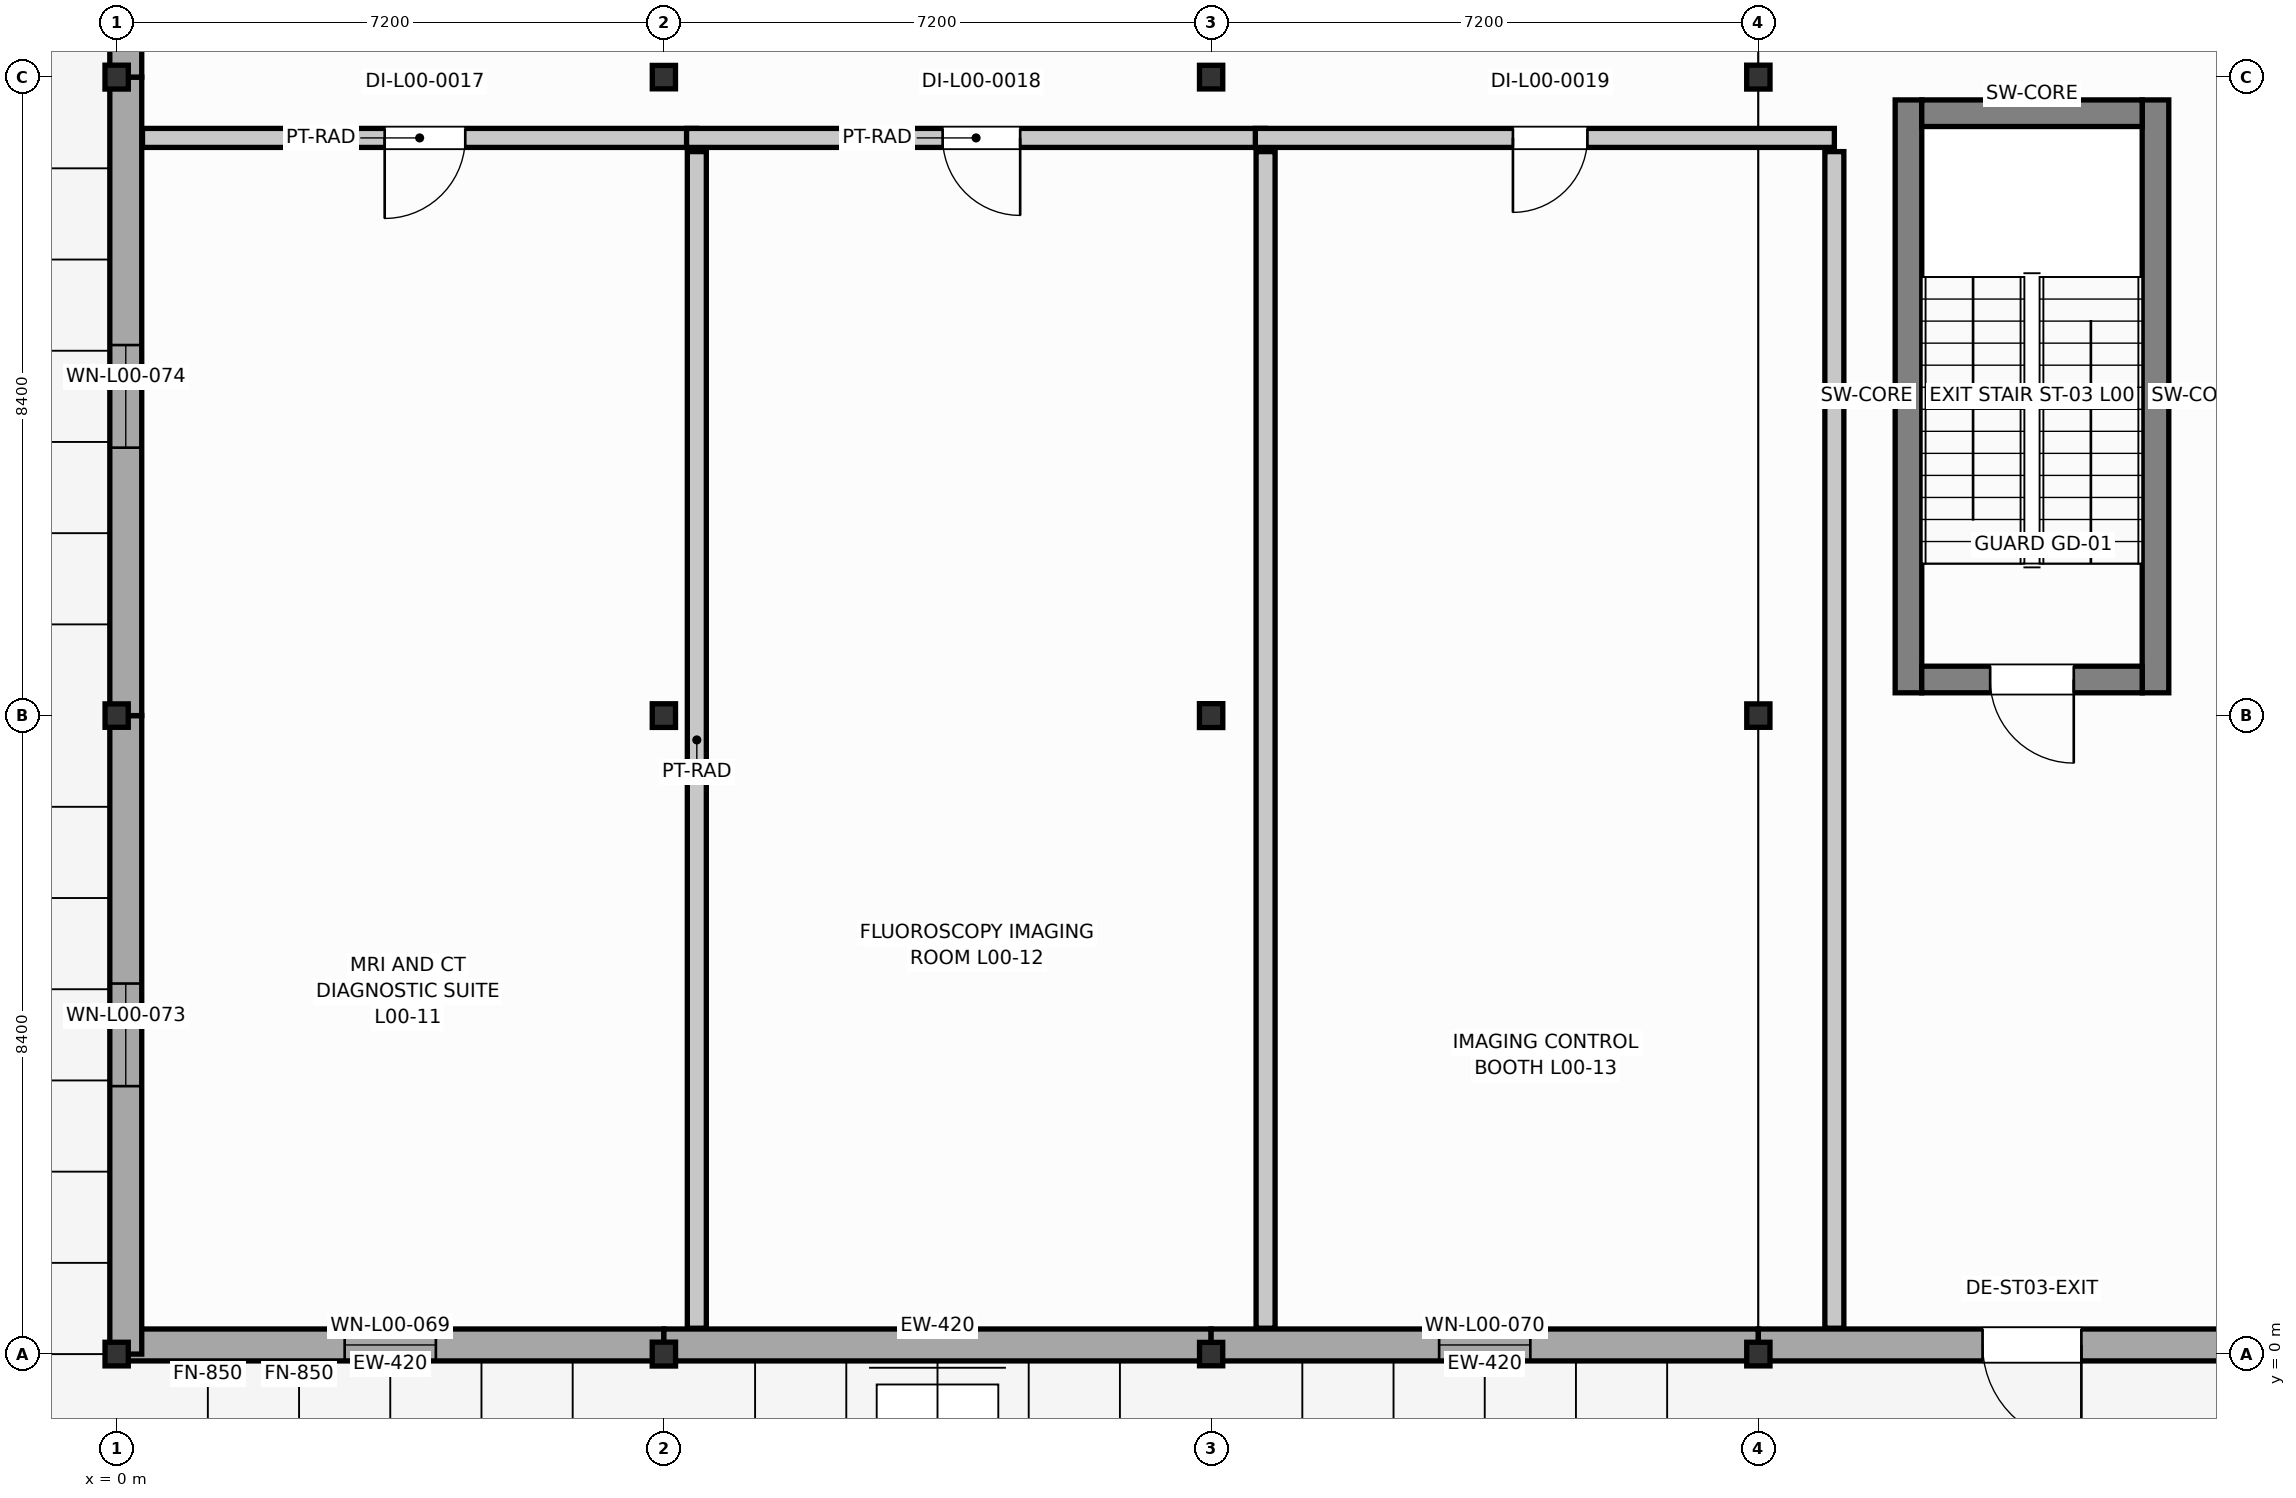
"""IFC4 building model, lengths in metres.
Left out: names, types, materials, properties, quantities, classifications, styles, units other than length and angle.
Written with IfcOpenShell. Run it as: python <this file> out.ifc"""

import sys

from ifc_helpers import new_model, si_unit, direction, frame, frame_2d, origin, origin_with_axes, origin_2d, place, context, subcontext, project, spatial, rectangle, i_section, extrude, element, fill, save


model = new_model("IFC4")
c1 = context("Model", 3, precision=1e-05, world=origin(), true_north=direction((0.0, 1.0)))
c2 = subcontext(c1, "Body", "Model", "MODEL_VIEW")
j1 = project(units=[si_unit("LENGTHUNIT", "METRE"), si_unit("PLANEANGLEUNIT", "RADIAN")], contexts=[c1])
p1 = place(None, origin())
s1 = spatial("IfcSite", under=j1, at=p1, CompositionType="ELEMENT")
p2 = place(p1, origin())
s2 = spatial("IfcBuilding", under=s1, at=p2, CompositionType="ELEMENT")
p3 = place(p2, origin())
s3 = spatial("IfcBuildingStorey", under=s2, at=p3, CompositionType="ELEMENT", Elevation=0.0)
p4 = place(p3, origin_with_axes())
e1 = element("IfcColumn", 1, at=p4, inside=s3, PredefinedType="COLUMN", context=c2, shape_type="SweptSolid", body=[
    extrude(i_section(OverallWidth=0.306, OverallDepth=0.311, WebThickness=0.011, FlangeThickness=0.017, FilletRadius=0.015, at=origin_2d()), origin(), (0.0, 0.0, 1.0), 4.8),
])
p5 = place(p3, frame((0.0, 8.4, 0.0), z_axis=(0.0, 0.0, 1.0), x_axis=(1.0, 0.0, 0.0)))
e2 = element("IfcColumn", 2, at=p5, inside=s3, PredefinedType="COLUMN", context=c2, shape_type="SweptSolid", body=[
    extrude(i_section(OverallWidth=0.305, OverallDepth=0.308, WebThickness=0.01, FlangeThickness=0.015, FilletRadius=0.015, at=origin_2d()), origin(), (0.0, 0.0, 1.0), 4.8),
])
for number, where, z_axis, x_axis in (
    (3, (0.0, 16.8, 0.0), (0.0, 0.0, 1.0), (1.0, 0.0, 0.0)),
    (4, (7.2, 0.0, 0.0), (0.0, 0.0, 1.0), (1.0, 0.0, 0.0)),
):
    element("IfcColumn", number, at=place(p3, frame(where, z_axis=z_axis, x_axis=x_axis)), inside=s3, PredefinedType="COLUMN", context=c2, shape_type="SweptSolid", body=[
        extrude(i_section(OverallWidth=0.307, OverallDepth=0.314, WebThickness=0.012, FlangeThickness=0.019, FilletRadius=0.016, at=origin_2d()), origin(), (0.0, 0.0, 1.0), 4.8),
    ])
p6 = place(p3, frame((7.2, 8.4, 0.0), z_axis=(0.0, 0.0, 1.0), x_axis=(1.0, 0.0, 0.0)))
e5 = element("IfcColumn", 5, at=p6, inside=s3, PredefinedType="COLUMN", context=c2, shape_type="SweptSolid", body=[
    extrude(i_section(OverallWidth=0.306, OverallDepth=0.311, WebThickness=0.011, FlangeThickness=0.017, FilletRadius=0.015, at=origin_2d()), origin(), (0.0, 0.0, 1.0), 4.8),
])
for number, where, z_axis, x_axis in (
    (6, (7.2, 16.8, 0.0), (0.0, 0.0, 1.0), (1.0, 0.0, 0.0)),
    (7, (14.4, 0.0, 0.0), (0.0, 0.0, 1.0), (1.0, 0.0, 0.0)),
):
    element("IfcColumn", number, at=place(p3, frame(where, z_axis=z_axis, x_axis=x_axis)), inside=s3, PredefinedType="COLUMN", context=c2, shape_type="SweptSolid", body=[
        extrude(i_section(OverallWidth=0.305, OverallDepth=0.308, WebThickness=0.01, FlangeThickness=0.015, FilletRadius=0.015, at=origin_2d()), origin(), (0.0, 0.0, 1.0), 4.8),
    ])
p7 = place(p3, frame((14.4, 8.4, 0.0), z_axis=(0.0, 0.0, 1.0), x_axis=(1.0, 0.0, 0.0)))
e8 = element("IfcColumn", 8, at=p7, inside=s3, PredefinedType="COLUMN", context=c2, shape_type="SweptSolid", body=[
    extrude(i_section(OverallWidth=0.307, OverallDepth=0.314, WebThickness=0.012, FlangeThickness=0.019, FilletRadius=0.016, at=origin_2d()), origin(), (0.0, 0.0, 1.0), 4.8),
])
for number, where, z_axis, x_axis in (
    (9, (14.4, 16.8, 0.0), (0.0, 0.0, 1.0), (1.0, 0.0, 0.0)),
    (10, (21.6, 0.0, 0.0), (0.0, 0.0, 1.0), (1.0, 0.0, 0.0)),
):
    element("IfcColumn", number, at=place(p3, frame(where, z_axis=z_axis, x_axis=x_axis)), inside=s3, PredefinedType="COLUMN", context=c2, shape_type="SweptSolid", body=[
        extrude(i_section(OverallWidth=0.306, OverallDepth=0.311, WebThickness=0.011, FlangeThickness=0.017, FilletRadius=0.015, at=origin_2d()), origin(), (0.0, 0.0, 1.0), 4.8),
    ])
p8 = place(p3, frame((21.6, 8.4, 0.0), z_axis=(0.0, 0.0, 1.0), x_axis=(1.0, 0.0, 0.0)))
e11 = element("IfcColumn", 11, at=p8, inside=s3, PredefinedType="COLUMN", context=c2, shape_type="SweptSolid", body=[
    extrude(i_section(OverallWidth=0.305, OverallDepth=0.308, WebThickness=0.01, FlangeThickness=0.015, FilletRadius=0.015, at=origin_2d()), origin(), (0.0, 0.0, 1.0), 4.8),
])
p9 = place(p3, frame((21.6, 16.8, 0.0), z_axis=(0.0, 0.0, 1.0), x_axis=(1.0, 0.0, 0.0)))
e12 = element("IfcColumn", 12, at=p9, inside=s3, PredefinedType="COLUMN", context=c2, shape_type="SweptSolid", body=[
    extrude(i_section(OverallWidth=0.307, OverallDepth=0.314, WebThickness=0.012, FlangeThickness=0.019, FilletRadius=0.016, at=origin_2d()), origin(), (0.0, 0.0, 1.0), 4.8),
])
for number, where, z_axis, x_axis in (
    (13, (23.575, 8.7, 0.0), (0.0, 0.0, 1.0), (0.0, 1.0, 0.0)),
    (14, (26.825, 8.7, 0.0), (0.0, 0.0, 1.0), (0.0, 1.0, 0.0)),
):
    element("IfcWall", number, at=place(p3, frame(where, z_axis=z_axis, x_axis=x_axis)), inside=s3, PredefinedType="SHEAR", context=c2, shape_type="SweptSolid", body=[
        extrude(rectangle(XDim=7.8, YDim=0.35, at=frame_2d((3.9, 0.0))), origin(), (0.0, 0.0, 1.0), 4.56),
    ])
p10 = place(p3, frame((23.75, 16.325, 0.0), z_axis=(0.0, 0.0, 1.0), x_axis=(1.0, 0.0, 0.0)))
e15 = element("IfcWall", 15, at=p10, inside=s3, PredefinedType="SHEAR", context=c2, shape_type="SweptSolid", body=[
    extrude(rectangle(XDim=2.9, YDim=0.35, at=frame_2d((1.45, 0.0))), origin(), (0.0, 0.0, 1.0), 4.56),
])
p11 = place(p3, frame((23.75, 8.875, 0.0), z_axis=(0.0, 0.0, 1.0), x_axis=(1.0, 0.0, 0.0)))
e16 = element("IfcWall", 16, at=p11, inside=s3, PredefinedType="SHEAR", context=c2, shape_type="SweptSolid", body=[
    extrude(rectangle(XDim=2.9, YDim=0.35, at=frame_2d((1.45, 0.0))), origin(), (0.0, 0.0, 1.0), 4.56),
])
p12 = place(p11, frame((0.9, 0.0, 0.0)))
e17 = element("IfcOpeningElement", 17, at=p12, cuts=e16, PredefinedType="OPENING", context=c2, shape_type="SweptSolid", body=[
    extrude(rectangle(XDim=1.1, YDim=2.15, at=frame_2d((0.55, 1.075))), frame((0.0, 0.185, 0.0), z_axis=(0.0, -1.0, 0.0), x_axis=(1.0, 0.0, 0.0)), (0.0, 0.0, 1.0), 0.37),
])
p13 = place(p3, frame((0.0, 0.12, 0.0), z_axis=(0.0, 0.0, 1.0), x_axis=(1.0, 0.0, 0.0)))
e18 = element("IfcWall", 18, at=p13, inside=s3, PredefinedType="SOLIDWALL", context=c2, shape_type="SweptSolid", body=[
    extrude(rectangle(XDim=7.2, YDim=0.42, at=frame_2d((3.6, 0.0))), origin(), (0.0, 0.0, 1.0), 4.082),
])
p14 = place(p13, frame((3.0, 0.0, 0.95)))
e19 = element("IfcOpeningElement", 19, at=p14, cuts=e18, PredefinedType="OPENING", context=c2, shape_type="SweptSolid", body=[
    extrude(rectangle(XDim=1.2, YDim=1.15, at=frame_2d((0.6, 0.575))), frame((0.0, 0.22, 0.0), z_axis=(0.0, -1.0, 0.0), x_axis=(1.0, 0.0, 0.0)), (0.0, 0.0, 1.0), 0.44),
])
p15 = place(p3, frame((7.2, 0.12, 0.0), z_axis=(0.0, 0.0, 1.0), x_axis=(1.0, 0.0, 0.0)))
e20 = element("IfcWall", 20, at=p15, inside=s3, PredefinedType="SOLIDWALL", context=c2, shape_type="SweptSolid", body=[
    extrude(rectangle(XDim=7.2, YDim=0.42, at=frame_2d((3.6, 0.0))), origin(), (0.0, 0.0, 1.0), 4.082),
])
p16 = place(p3, frame((14.4, 0.12, 0.0), z_axis=(0.0, 0.0, 1.0), x_axis=(1.0, 0.0, 0.0)))
e21 = element("IfcWall", 21, at=p16, inside=s3, PredefinedType="SOLIDWALL", context=c2, shape_type="SweptSolid", body=[
    extrude(rectangle(XDim=7.2, YDim=0.42, at=frame_2d((3.6, 0.0))), origin(), (0.0, 0.0, 1.0), 4.082),
])
p17 = place(p16, frame((3.0, 0.0, 0.95)))
e22 = element("IfcOpeningElement", 22, at=p17, cuts=e21, PredefinedType="OPENING", context=c2, shape_type="SweptSolid", body=[
    extrude(rectangle(XDim=1.2, YDim=1.35, at=frame_2d((0.6, 0.675))), frame((0.0, 0.22, 0.0), z_axis=(0.0, -1.0, 0.0), x_axis=(1.0, 0.0, 0.0)), (0.0, 0.0, 1.0), 0.44),
])
p18 = place(p3, frame((21.6, 0.12, 0.0), z_axis=(0.0, 0.0, 1.0), x_axis=(1.0, 0.0, 0.0)))
e23 = element("IfcWall", 23, at=p18, inside=s3, PredefinedType="SOLIDWALL", context=c2, shape_type="SweptSolid", body=[
    extrude(rectangle(XDim=7.2, YDim=0.42, at=frame_2d((3.6, 0.0))), origin(), (0.0, 0.0, 1.0), 4.082),
])
p19 = place(p18, frame((2.95, 0.0, 0.0)))
e24 = element("IfcOpeningElement", 24, at=p19, cuts=e23, PredefinedType="OPENING", context=c2, shape_type="SweptSolid", body=[
    extrude(rectangle(XDim=1.3, YDim=2.2, at=frame_2d((0.65, 1.1))), frame((0.0, 0.22, 0.0), z_axis=(0.0, -1.0, 0.0), x_axis=(1.0, 0.0, 0.0)), (0.0, 0.0, 1.0), 0.44),
])
p20 = place(p3, frame((0.12, 0.0, 0.0), z_axis=(0.0, 0.0, 1.0), x_axis=(0.0, 1.0, 0.0)))
e25 = element("IfcWall", 25, at=p20, inside=s3, PredefinedType="SOLIDWALL", context=c2, shape_type="SweptSolid", body=[
    extrude(rectangle(XDim=8.4, YDim=0.42, at=frame_2d((4.2, 0.0))), origin(), (0.0, 0.0, 1.0), 3.691),
])
p21 = place(p20, frame((3.525, 0.0, 0.95)))
e26 = element("IfcOpeningElement", 26, at=p21, cuts=e25, PredefinedType="OPENING", context=c2, shape_type="SweptSolid", body=[
    extrude(rectangle(XDim=1.35, YDim=1.15, at=frame_2d((0.675, 0.575))), frame((0.0, 0.22, 0.0), z_axis=(0.0, -1.0, 0.0), x_axis=(1.0, 0.0, 0.0)), (0.0, 0.0, 1.0), 0.44),
])
p22 = place(p3, frame((0.12, 8.4, 0.0), z_axis=(0.0, 0.0, 1.0), x_axis=(0.0, 1.0, 0.0)))
e27 = element("IfcWall", 27, at=p22, inside=s3, PredefinedType="SOLIDWALL", context=c2, shape_type="SweptSolid", body=[
    extrude(rectangle(XDim=8.4, YDim=0.42, at=frame_2d((4.2, 0.0))), origin(), (0.0, 0.0, 1.0), 3.691),
])
p23 = place(p22, frame((3.525, 0.0, 0.95)))
e28 = element("IfcOpeningElement", 28, at=p23, cuts=e27, PredefinedType="OPENING", context=c2, shape_type="SweptSolid", body=[
    extrude(rectangle(XDim=1.35, YDim=1.35, at=frame_2d((0.675, 0.675))), frame((0.0, 0.22, 0.0), z_axis=(0.0, -1.0, 0.0), x_axis=(1.0, 0.0, 0.0)), (0.0, 0.0, 1.0), 0.44),
])
p24 = place(p3, frame((0.12, 16.8, 0.0), z_axis=(0.0, 0.0, 1.0), x_axis=(0.0, 1.0, 0.0)))
e29 = element("IfcWall", 29, at=p24, inside=s3, PredefinedType="SOLIDWALL", context=c2, shape_type="SweptSolid", body=[
    extrude(rectangle(XDim=8.4, YDim=0.42, at=frame_2d((4.2, 0.0))), origin(), (0.0, 0.0, 1.0), 3.691),
])
p25 = place(p24, frame((3.525, 0.0, 0.95)))
e30 = element("IfcOpeningElement", 30, at=p25, cuts=e29, PredefinedType="OPENING", context=c2, shape_type="SweptSolid", body=[
    extrude(rectangle(XDim=1.35, YDim=1.55, at=frame_2d((0.675, 0.775))), frame((0.0, 0.22, 0.0), z_axis=(0.0, -1.0, 0.0), x_axis=(1.0, 0.0, 0.0)), (0.0, 0.0, 1.0), 0.44),
])
p26 = place(p3, frame((0.34, 16.0, 0.0), z_axis=(0.0, 0.0, 1.0), x_axis=(1.0, 0.0, 0.0)))
e31 = element("IfcWall", 31, at=p26, inside=s3, PredefinedType="SOLIDWALL", context=c2, shape_type="SweptSolid", body=[
    extrude(rectangle(XDim=7.293, YDim=0.25, at=frame_2d((3.646, 0.0))), origin(), (0.0, 0.0, 1.0), 3.852),
])
p27 = place(p26, frame((3.187, 0.0, 0.0)))
e32 = element("IfcOpeningElement", 32, at=p27, cuts=e31, PredefinedType="OPENING", context=c2, shape_type="SweptSolid", body=[
    extrude(rectangle(XDim=1.06, YDim=2.05, at=frame_2d((0.53, 1.025))), frame((0.0, 0.135, 0.0), z_axis=(0.0, -1.0, 0.0), x_axis=(1.0, 0.0, 0.0)), (0.0, 0.0, 1.0), 0.27),
])
p28 = place(p3, frame((7.633, 15.82, 0.0), z_axis=(0.0, 0.0, 1.0), x_axis=(0.0, -1.0, 0.0)))
e33 = element("IfcWall", 33, at=p28, inside=s3, PredefinedType="SOLIDWALL", context=c2, shape_type="SweptSolid", body=[
    extrude(rectangle(XDim=15.48, YDim=0.25, at=frame_2d((7.74, 0.0))), origin(), (0.0, 0.0, 1.0), 4.132),
])
p29 = place(p3, frame((7.498, 16.0, 0.0), z_axis=(0.0, 0.0, 1.0), x_axis=(1.0, 0.0, 0.0)))
e34 = element("IfcWall", 34, at=p29, inside=s3, PredefinedType="SOLIDWALL", context=c2, shape_type="SweptSolid", body=[
    extrude(rectangle(XDim=7.618, YDim=0.25, at=frame_2d((3.809, 0.0))), origin(), (0.0, 0.0, 1.0), 4.001),
])
p30 = place(p29, frame((3.369, 0.0, 0.0)))
e35 = element("IfcOpeningElement", 35, at=p30, cuts=e34, PredefinedType="OPENING", context=c2, shape_type="SweptSolid", body=[
    extrude(rectangle(XDim=1.02, YDim=2.05, at=frame_2d((0.51, 1.025))), frame((0.0, 0.135, 0.0), z_axis=(0.0, -1.0, 0.0), x_axis=(1.0, 0.0, 0.0)), (0.0, 0.0, 1.0), 0.27),
])
p31 = place(p3, frame((15.117, 15.82, 0.0), z_axis=(0.0, 0.0, 1.0), x_axis=(0.0, -1.0, 0.0)))
e36 = element("IfcWall", 36, at=p31, inside=s3, PredefinedType="SOLIDWALL", context=c2, shape_type="SweptSolid", body=[
    extrude(rectangle(XDim=15.48, YDim=0.25, at=frame_2d((7.74, 0.0))), origin(), (0.0, 0.0, 1.0), 4.135),
])
p32 = place(p3, frame((14.982, 16.0, 0.0), z_axis=(0.0, 0.0, 1.0), x_axis=(1.0, 0.0, 0.0)))
e37 = element("IfcWall", 37, at=p32, inside=s3, PredefinedType="SOLIDWALL", context=c2, shape_type="SweptSolid", body=[
    extrude(rectangle(XDim=7.618, YDim=0.25, at=frame_2d((3.809, 0.0))), origin(), (0.0, 0.0, 1.0), 4.079),
])
p33 = place(p32, frame((3.389, 0.0, 0.0)))
e38 = element("IfcOpeningElement", 38, at=p33, cuts=e37, PredefinedType="OPENING", context=c2, shape_type="SweptSolid", body=[
    extrude(rectangle(XDim=0.98, YDim=2.05, at=frame_2d((0.49, 1.025))), frame((0.0, 0.135, 0.0), z_axis=(0.0, -1.0, 0.0), x_axis=(1.0, 0.0, 0.0)), (0.0, 0.0, 1.0), 0.27),
])
p34 = place(p3, frame((22.6, 15.82, 0.0), z_axis=(0.0, 0.0, 1.0), x_axis=(0.0, -1.0, 0.0)))
e39 = element("IfcWall", 39, at=p34, inside=s3, PredefinedType="SOLIDWALL", context=c2, shape_type="SweptSolid", body=[
    extrude(rectangle(XDim=15.48, YDim=0.25, at=frame_2d((7.74, 0.0))), origin(), (0.0, 0.0, 1.0), 4.132),
])
p35 = place(p12, frame((1.1, 0.0, 0.0), z_axis=(0.0, 0.0, 1.0), x_axis=(-1.0, 0.0, 0.0)))
e40 = element("IfcDoor", 40, at=p35, inside=s3, OperationType="SINGLE_SWING_LEFT", PredefinedType="DOOR", context=c2, shape_type="SweptSolid", body=[
    extrude(rectangle(XDim=1.1, YDim=2.15, at=frame_2d((0.55, 1.075))), frame((0.0, 0.025, 0.0), z_axis=(0.0, -1.0, 0.0), x_axis=(1.0, 0.0, 0.0)), (0.0, 0.0, 1.0), 0.05),
])
fill(e17, e40)
p36 = place(p14, origin())
e41 = element("IfcWindow", 41, at=p36, inside=s3, PartitioningType="SINGLE_PANEL", PredefinedType="WINDOW", context=c2, shape_type="SweptSolid", body=[
    extrude(rectangle(XDim=1.2, YDim=1.15, at=frame_2d((0.6, 0.575))), frame((0.0, 0.03, 0.0), z_axis=(0.0, -1.0, 0.0), x_axis=(1.0, 0.0, 0.0)), (0.0, 0.0, 1.0), 0.06),
])
fill(e19, e41)
p37 = place(p17, origin())
e42 = element("IfcWindow", 42, at=p37, inside=s3, PartitioningType="SINGLE_PANEL", PredefinedType="WINDOW", context=c2, shape_type="SweptSolid", body=[
    extrude(rectangle(XDim=1.2, YDim=1.35, at=frame_2d((0.6, 0.675))), frame((0.0, 0.03, 0.0), z_axis=(0.0, -1.0, 0.0), x_axis=(1.0, 0.0, 0.0)), (0.0, 0.0, 1.0), 0.06),
])
fill(e22, e42)
p38 = place(p19, frame((1.3, 0.0, 0.0), z_axis=(0.0, 0.0, 1.0), x_axis=(-1.0, 0.0, 0.0)))
e43 = element("IfcDoor", 43, at=p38, inside=s3, OperationType="SINGLE_SWING_LEFT", PredefinedType="DOOR", context=c2, shape_type="SweptSolid", body=[
    extrude(rectangle(XDim=1.3, YDim=2.2, at=frame_2d((0.65, 1.1))), frame((0.0, 0.025, 0.0), z_axis=(0.0, -1.0, 0.0), x_axis=(1.0, 0.0, 0.0)), (0.0, 0.0, 1.0), 0.05),
])
fill(e24, e43)
p39 = place(p21, origin())
e44 = element("IfcWindow", 44, at=p39, inside=s3, PartitioningType="SINGLE_PANEL", PredefinedType="WINDOW", context=c2, shape_type="SweptSolid", body=[
    extrude(rectangle(XDim=1.35, YDim=1.15, at=frame_2d((0.675, 0.575))), frame((0.0, 0.03, 0.0), z_axis=(0.0, -1.0, 0.0), x_axis=(1.0, 0.0, 0.0)), (0.0, 0.0, 1.0), 0.06),
])
fill(e26, e44)
p40 = place(p23, origin())
e45 = element("IfcWindow", 45, at=p40, inside=s3, PartitioningType="SINGLE_PANEL", PredefinedType="WINDOW", context=c2, shape_type="SweptSolid", body=[
    extrude(rectangle(XDim=1.35, YDim=1.35, at=frame_2d((0.675, 0.675))), frame((0.0, 0.03, 0.0), z_axis=(0.0, -1.0, 0.0), x_axis=(1.0, 0.0, 0.0)), (0.0, 0.0, 1.0), 0.06),
])
fill(e28, e45)
p41 = place(p27, frame((1.06, 0.0, 0.0), z_axis=(0.0, 0.0, 1.0), x_axis=(-1.0, 0.0, 0.0)))
e46 = element("IfcDoor", 46, at=p41, inside=s3, OperationType="SINGLE_SWING_RIGHT", PredefinedType="DOOR", context=c2, shape_type="SweptSolid", body=[
    extrude(rectangle(XDim=1.06, YDim=2.05, at=frame_2d((0.53, 1.025))), frame((0.0, 0.025, 0.0), z_axis=(0.0, -1.0, 0.0), x_axis=(1.0, 0.0, 0.0)), (0.0, 0.0, 1.0), 0.05),
])
fill(e32, e46)
p42 = place(p30, frame((1.02, 0.0, 0.0), z_axis=(0.0, 0.0, 1.0), x_axis=(-1.0, 0.0, 0.0)))
e47 = element("IfcDoor", 47, at=p42, inside=s3, OperationType="SINGLE_SWING_LEFT", PredefinedType="DOOR", context=c2, shape_type="SweptSolid", body=[
    extrude(rectangle(XDim=1.02, YDim=2.05, at=frame_2d((0.51, 1.025))), frame((0.0, 0.025, 0.0), z_axis=(0.0, -1.0, 0.0), x_axis=(1.0, 0.0, 0.0)), (0.0, 0.0, 1.0), 0.05),
])
fill(e35, e47)
p43 = place(p33, frame((0.98, 0.0, 0.0), z_axis=(0.0, 0.0, 1.0), x_axis=(-1.0, 0.0, 0.0)))
e48 = element("IfcDoor", 48, at=p43, inside=s3, OperationType="SINGLE_SWING_RIGHT", PredefinedType="DOOR", context=c2, shape_type="SweptSolid", body=[
    extrude(rectangle(XDim=0.98, YDim=2.05, at=frame_2d((0.49, 1.025))), frame((0.0, 0.025, 0.0), z_axis=(0.0, -1.0, 0.0), x_axis=(1.0, 0.0, 0.0)), (0.0, 0.0, 1.0), 0.05),
])
fill(e38, e48)
save(model, sys.argv[1])
